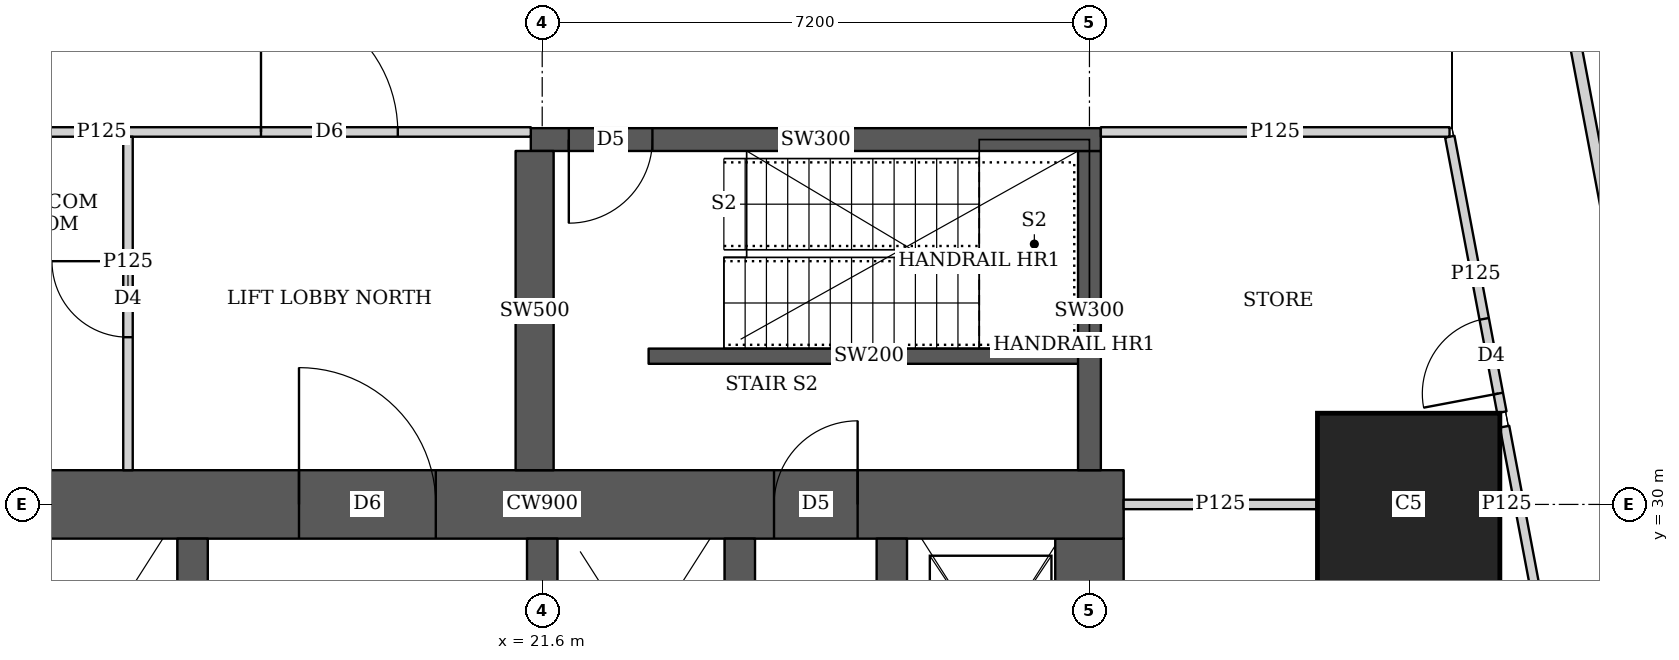
"""IFC4 building model, lengths in metres.
Left out: names, types, materials, properties, quantities, classifications, styles, units other than length and angle.
Written with IfcOpenShell. Run it as: python <this file> out.ifc"""

import sys

from ifc_helpers import new_model, si_unit, direction, frame, frame_2d, origin, origin_2d, place, context, subcontext, project, spatial, rectangle, extrude, element, fill, save


model = new_model("IFC4")
c1 = context("Model", 3, precision=1e-05, world=origin(), true_north=direction((0.0, 1.0)))
c2 = subcontext(c1, "Body", "Model", "MODEL_VIEW")
j1 = project(units=[si_unit("LENGTHUNIT", "METRE"), si_unit("PLANEANGLEUNIT", "RADIAN")], contexts=[c1])
p1 = place(None, origin())
s1 = spatial("IfcSite", under=j1, at=p1, CompositionType="ELEMENT")
p2 = place(p1, origin())
s2 = spatial("IfcBuilding", under=s1, at=p2, CompositionType="ELEMENT")
p3 = place(p2, frame((0.0, 0.0, 10.1)))
s3 = spatial("IfcBuildingStorey", under=s2, at=p3, CompositionType="ELEMENT", Elevation=10.1)
p4 = place(p3, frame((33.0, 30.0, 0.0), z_axis=(0.0, 0.0, 1.0), x_axis=(1.0, 0.0, 0.0)))
e1 = element("IfcColumn", 1, at=p4, inside=s3, PredefinedType="COLUMN", context=c2, shape_type="SweptSolid", body=[
    extrude(rectangle(XDim=2.4, YDim=2.4, at=origin_2d()), origin(), (0.0, 0.0, 1.0), 4.5),
])
p5 = place(p3, frame((13.95, 30.0, 0.0), z_axis=(0.0, 0.0, 1.0), x_axis=(1.0, 0.0, 0.0)))
e2 = element("IfcWall", 2, at=p5, inside=s3, PredefinedType="SHEAR", context=c2, shape_type="SweptSolid", body=[
    extrude(rectangle(XDim=15.3, YDim=0.9, at=frame_2d((7.65, 0.0))), origin(), (0.0, 0.0, 1.0), 4.5),
])
p6 = place(p5, frame((4.45, 0.0, 0.0)))
e3 = element("IfcOpeningElement", 3, at=p6, cuts=e2, PredefinedType="OPENING", context=c2, shape_type="SweptSolid", body=[
    extrude(rectangle(XDim=1.8, YDim=2.1, at=frame_2d((0.9, 1.05))), frame((0.0, 0.46, 0.0), z_axis=(0.0, -1.0, 0.0), x_axis=(1.0, 0.0, 0.0)), (0.0, 0.0, 1.0), 0.92),
])
p7 = place(p5, frame((10.7, 0.0, 0.0)))
e4 = element("IfcOpeningElement", 4, at=p7, cuts=e2, PredefinedType="OPENING", context=c2, shape_type="SweptSolid", body=[
    extrude(rectangle(XDim=1.1, YDim=2.1, at=frame_2d((0.55, 1.05))), frame((0.0, 0.46, 0.0), z_axis=(0.0, -1.0, 0.0), x_axis=(1.0, 0.0, 0.0)), (0.0, 0.0, 1.0), 0.92),
])
p8 = place(p3, frame((28.8, 15.45, 0.0), z_axis=(0.0, 0.0, 1.0), x_axis=(0.0, 1.0, 0.0)))
e5 = element("IfcWall", 5, at=p8, inside=s3, PredefinedType="SHEAR", context=c2, shape_type="SweptSolid", body=[
    extrude(rectangle(XDim=14.1, YDim=0.9, at=frame_2d((7.05, 0.0))), origin(), (0.0, 0.0, 1.0), 4.5),
])
for number, where, z_axis, x_axis in (
    (6, (17.0, 15.45, 0.0), (0.0, 0.0, 1.0), (0.0, 1.0, 0.0)),
    (7, (21.6, 15.45, 0.0), (0.0, 0.0, 1.0), (0.0, 1.0, 0.0)),
    (8, (24.2, 15.45, 0.0), (0.0, 0.0, 1.0), (0.0, 1.0, 0.0)),
):
    element("IfcWall", number, at=place(p3, frame(where, z_axis=z_axis, x_axis=x_axis)), inside=s3, PredefinedType="SHEAR", context=c2, shape_type="SweptSolid", body=[
        extrude(rectangle(XDim=14.1, YDim=0.4, at=frame_2d((7.05, 0.0))), origin(), (0.0, 0.0, 1.0), 4.5),
    ])
p9 = place(p3, frame((26.2, 26.45, 0.0), z_axis=(0.0, 0.0, 1.0), x_axis=(0.0, 1.0, 0.0)))
e9 = element("IfcWall", 9, at=p9, inside=s3, PredefinedType="SHEAR", context=c2, shape_type="SweptSolid", body=[
    extrude(rectangle(XDim=3.1, YDim=0.4, at=frame_2d((1.55, 0.0))), origin(), (0.0, 0.0, 1.0), 4.5),
])
p10 = place(p9, frame((1.075, 0.0, 0.0)))
e10 = element("IfcOpeningElement", 10, at=p10, cuts=e9, PredefinedType="OPENING", context=c2, shape_type="SweptSolid", body=[
    extrude(rectangle(XDim=1.2, YDim=2.1, at=frame_2d((0.6, 1.05))), frame((0.0, 0.21, 0.0), z_axis=(0.0, -1.0, 0.0), x_axis=(1.0, 0.0, 0.0)), (0.0, 0.0, 1.0), 0.42),
])
p11 = place(p3, frame((21.45, 34.8, 0.0), z_axis=(0.0, 0.0, 1.0), x_axis=(1.0, 0.0, 0.0)))
e11 = element("IfcWall", 11, at=p11, inside=s3, PredefinedType="SHEAR", context=c2, shape_type="SweptSolid", body=[
    extrude(rectangle(XDim=7.5, YDim=0.3, at=frame_2d((3.75, 0.0))), origin(), (0.0, 0.0, 1.0), 4.5),
])
p12 = place(p11, frame((0.5, 0.0, 0.0)))
e12 = element("IfcOpeningElement", 12, at=p12, cuts=e11, PredefinedType="OPENING", context=c2, shape_type="SweptSolid", body=[
    extrude(rectangle(XDim=1.1, YDim=2.1, at=frame_2d((0.55, 1.05))), frame((0.0, 0.16, 0.0), z_axis=(0.0, -1.0, 0.0), x_axis=(1.0, 0.0, 0.0)), (0.0, 0.0, 1.0), 0.32),
])
p13 = place(p3, frame((21.5, 30.45, 0.0), z_axis=(0.0, 0.0, 1.0), x_axis=(0.0, 1.0, 0.0)))
e13 = element("IfcWall", 13, at=p13, inside=s3, PredefinedType="SHEAR", context=c2, shape_type="SweptSolid", body=[
    extrude(rectangle(XDim=4.2, YDim=0.5, at=frame_2d((2.1, 0.0))), origin(), (0.0, 0.0, 1.0), 4.5),
])
p14 = place(p3, frame((28.8, 30.45, 0.0), z_axis=(0.0, 0.0, 1.0), x_axis=(0.0, 1.0, 0.0)))
e14 = element("IfcWall", 14, at=p14, inside=s3, PredefinedType="SHEAR", context=c2, shape_type="SweptSolid", body=[
    extrude(rectangle(XDim=4.2, YDim=0.3, at=frame_2d((2.1, 0.0))), origin(), (0.0, 0.0, 1.0), 4.5),
])
p15 = place(p3, frame((35.151, 36.285, 0.0), z_axis=(0.0, 0.0, 1.0), x_axis=(0.18558085056, -0.982628998099, 0.0)))
e15 = element("IfcWall", 15, at=p15, inside=s3, PredefinedType="SOLIDWALL", context=c2, shape_type="SweptSolid", body=[
    extrude(rectangle(XDim=34.352, YDim=0.15, at=frame_2d((17.176, 0.0))), origin(), (0.0, 0.0, 1.0), 2.4),
])
p16 = place(p15, frame((13.189, 0.0, 0.0)))
e16 = element("IfcOpeningElement", 16, at=p16, cuts=e15, PredefinedType="OPENING", context=c2, shape_type="SweptSolid", body=[
    extrude(rectangle(XDim=1.3, YDim=2.1, at=frame_2d((0.65, 1.05))), frame((0.0, 0.085, 0.0), z_axis=(0.0, -1.0, 0.0), x_axis=(1.0, 0.0, 0.0)), (0.0, 0.0, 1.0), 0.17),
])
p17 = place(p15, frame((19.443, 0.0, 0.0)))
e17 = element("IfcOpeningElement", 17, at=p17, cuts=e15, PredefinedType="OPENING", context=c2, shape_type="SweptSolid", body=[
    extrude(rectangle(XDim=1.3, YDim=2.1, at=frame_2d((0.65, 1.05))), frame((0.0, 0.085, 0.0), z_axis=(0.0, -1.0, 0.0), x_axis=(1.0, 0.0, 0.0)), (0.0, 0.0, 1.0), 0.17),
])
p18 = place(p15, frame((25.444, 0.0, 0.0)))
e18 = element("IfcOpeningElement", 18, at=p18, cuts=e15, PredefinedType="OPENING", context=c2, shape_type="SweptSolid", body=[
    extrude(rectangle(XDim=1.3, YDim=2.1, at=frame_2d((0.65, 1.05))), frame((0.0, 0.085, 0.0), z_axis=(0.0, -1.0, 0.0), x_axis=(1.0, 0.0, 0.0)), (0.0, 0.0, 1.0), 0.17),
])
p19 = place(p3, frame((10.163, 34.9, 0.0), z_axis=(0.0, 0.0, 1.0), x_axis=(1.0, 0.0, 0.0)))
e19 = element("IfcWall", 19, at=p19, inside=s3, PredefinedType="PARTITIONING", context=c2, shape_type="SweptSolid", body=[
    extrude(rectangle(XDim=11.287, YDim=0.125, at=frame_2d((5.644, 0.0))), origin(), (0.0, 0.0, 1.0), 2.2),
])
p20 = place(p19, frame((7.737, 0.0, 0.0)))
e20 = element("IfcOpeningElement", 20, at=p20, cuts=e19, PredefinedType="OPENING", context=c2, shape_type="SweptSolid", body=[
    extrude(rectangle(XDim=1.8, YDim=2.1, at=frame_2d((0.9, 1.05))), frame((0.0, 0.073, 0.0), z_axis=(0.0, -1.0, 0.0), x_axis=(1.0, 0.0, 0.0)), (0.0, 0.0, 1.0), 0.145),
])
p21 = place(p3, frame((16.15, 30.45, 0.0), z_axis=(0.0, 0.0, 1.0), x_axis=(0.0, 1.0, 0.0)))
e21 = element("IfcWall", 21, at=p21, inside=s3, PredefinedType="PARTITIONING", context=c2, shape_type="SweptSolid", body=[
    extrude(rectangle(XDim=4.387, YDim=0.125, at=frame_2d((2.193, 0.0))), origin(), (0.0, 0.0, 1.0), 4.2),
])
p22 = place(p21, frame((1.75, 0.0, 0.0)))
e22 = element("IfcOpeningElement", 22, at=p22, cuts=e21, PredefinedType="OPENING", context=c2, shape_type="SweptSolid", body=[
    extrude(rectangle(XDim=1.0, YDim=2.1, at=frame_2d((0.5, 1.05))), frame((0.0, 0.073, 0.0), z_axis=(0.0, -1.0, 0.0), x_axis=(1.0, 0.0, 0.0)), (0.0, 0.0, 1.0), 0.145),
])
p23 = place(p3, frame((28.95, 34.9, 0.0), z_axis=(0.0, 0.0, 1.0), x_axis=(1.0, 0.0, 0.0)))
e23 = element("IfcWall", 23, at=p23, inside=s3, PredefinedType="PARTITIONING", context=c2, shape_type="SweptSolid", body=[
    extrude(rectangle(XDim=4.588, YDim=0.125, at=frame_2d((2.294, 0.0))), origin(), (0.0, 0.0, 1.0), 2.2),
])
p24 = place(p3, frame((37.059, 16.213, 0.0), z_axis=(0.0, 0.0, 1.0), x_axis=(-0.185585225745, 0.982628171785, 0.0)))
e24 = element("IfcWall", 24, at=p24, inside=s3, PredefinedType="PARTITIONING", context=c2, shape_type="SweptSolid", body=[
    extrude(rectangle(XDim=15.072, YDim=0.125, at=frame_2d((7.536, 0.0))), origin(), (0.0, 0.0, 1.0), 2.6),
])
p25 = place(p24, frame((7.221, 0.0, 0.0)))
e25 = element("IfcOpeningElement", 25, at=p25, cuts=e24, PredefinedType="OPENING", context=c2, shape_type="SweptSolid", body=[
    extrude(rectangle(XDim=1.0, YDim=2.1, at=frame_2d((0.5, 1.05))), frame((0.0, 0.073, 0.0), z_axis=(0.0, -1.0, 0.0), x_axis=(1.0, 0.0, 0.0)), (0.0, 0.0, 1.0), 0.145),
])
p26 = place(p24, frame((0.25, 0.0, 0.0)))
e26 = element("IfcOpeningElement", 26, at=p26, cuts=e24, PredefinedType="OPENING", context=c2, shape_type="SweptSolid", body=[
    extrude(rectangle(XDim=1.0, YDim=2.1, at=frame_2d((0.5, 1.05))), frame((0.0, 0.073, 0.0), z_axis=(0.0, -1.0, 0.0), x_axis=(1.0, 0.0, 0.0)), (0.0, 0.0, 1.0), 0.145),
])
p27 = place(p24, frame((3.99, 0.0, 0.0)))
e27 = element("IfcOpeningElement", 27, at=p27, cuts=e24, PredefinedType="OPENING", context=c2, shape_type="SweptSolid", body=[
    extrude(rectangle(XDim=1.0, YDim=2.1, at=frame_2d((0.5, 1.05))), frame((0.0, 0.073, 0.0), z_axis=(0.0, -1.0, 0.0), x_axis=(1.0, 0.0, 0.0)), (0.0, 0.0, 1.0), 0.145),
])
p28 = place(p3, frame((34.226, 31.213, 0.0), z_axis=(0.0, 0.0, 1.0), x_axis=(-0.185694811189, 0.982607468472, 0.0)))
e28 = element("IfcWall", 28, at=p28, inside=s3, PredefinedType="PARTITIONING", context=c2, shape_type="SweptSolid", body=[
    extrude(rectangle(XDim=3.689, YDim=0.125, at=frame_2d((1.845, 0.0))), origin(), (0.0, 0.0, 1.0), 4.2),
])
p29 = place(p28, frame((0.25, 0.0, 0.0)))
e29 = element("IfcOpeningElement", 29, at=p29, cuts=e28, PredefinedType="OPENING", context=c2, shape_type="SweptSolid", body=[
    extrude(rectangle(XDim=1.0, YDim=2.1, at=frame_2d((0.5, 1.05))), frame((0.0, 0.073, 0.0), z_axis=(0.0, -1.0, 0.0), x_axis=(1.0, 0.0, 0.0)), (0.0, 0.0, 1.0), 0.145),
])
p30 = place(p3, frame((29.25, 30.0, 0.0), z_axis=(0.0, 0.0, 1.0), x_axis=(1.0, 0.0, 0.0)))
e30 = element("IfcWall", 30, at=p30, inside=s3, PredefinedType="PARTITIONING", context=c2, shape_type="SweptSolid", body=[
    extrude(rectangle(XDim=2.549, YDim=0.125, at=frame_2d((1.274, 0.0))), origin(), (0.0, 0.0, 1.0), 4.2),
])
p31 = place(p3, frame((34.201, 30.0, 0.0), z_axis=(0.0, 0.0, 1.0), x_axis=(1.0, 0.0, 0.0)))
e31 = element("IfcWall", 31, at=p31, inside=s3, PredefinedType="PARTITIONING", context=c2, shape_type="SweptSolid", body=[
    extrude(rectangle(XDim=0.178, YDim=0.125, at=frame_2d((0.089, 0.0))), origin(), (0.0, 0.0, 1.0), 2.6),
])
p32 = place(p3, frame((23.0, 31.95, 0.0), z_axis=(0.0, 0.0, 1.0), x_axis=(1.0, 0.0, 0.0)))
e32 = element("IfcWall", 32, at=p32, inside=s3, PredefinedType="SHEAR", context=c2, shape_type="SweptSolid", body=[
    extrude(rectangle(XDim=5.8, YDim=0.2, at=frame_2d((2.9, 0.0))), origin(), (0.0, 0.0, 1.0), 4.5),
])
p33 = place(p22, origin())
e33 = element("IfcDoor", 33, at=p33, inside=s3, OperationType="SINGLE_SWING_RIGHT", PredefinedType="DOOR", context=c2, shape_type="SweptSolid", body=[
    extrude(rectangle(XDim=1.0, YDim=2.1, at=frame_2d((0.5, 1.05))), frame((0.0, 0.025, 0.0), z_axis=(0.0, -1.0, 0.0), x_axis=(1.0, 0.0, 0.0)), (0.0, 0.0, 1.0), 0.05),
])
fill(e22, e33)
p34 = place(p20, origin())
e34 = element("IfcDoor", 34, at=p34, inside=s3, OperationType="DOUBLE_DOOR_SINGLE_SWING", PredefinedType="DOOR", context=c2, shape_type="SweptSolid", body=[
    extrude(rectangle(XDim=1.8, YDim=2.1, at=frame_2d((0.9, 1.05))), frame((0.0, 0.025, 0.0), z_axis=(0.0, -1.0, 0.0), x_axis=(1.0, 0.0, 0.0)), (0.0, 0.0, 1.0), 0.05),
])
fill(e20, e34)
p35 = place(p29, origin())
e35 = element("IfcDoor", 35, at=p35, inside=s3, OperationType="SINGLE_SWING_LEFT", PredefinedType="DOOR", context=c2, shape_type="SweptSolid", body=[
    extrude(rectangle(XDim=1.0, YDim=2.1, at=frame_2d((0.5, 1.05))), frame((0.0, 0.025, 0.0), z_axis=(0.0, -1.0, 0.0), x_axis=(1.0, 0.0, 0.0)), (0.0, 0.0, 1.0), 0.05),
])
fill(e29, e35)
p36 = place(p6, origin())
e36 = element("IfcDoor", 36, at=p36, inside=s3, OperationType="DOUBLE_DOOR_SINGLE_SWING", PredefinedType="DOOR", context=c2, shape_type="SweptSolid", body=[
    extrude(rectangle(XDim=1.8, YDim=2.1, at=frame_2d((0.9, 1.05))), frame((0.0, 0.025, 0.0), z_axis=(0.0, -1.0, 0.0), x_axis=(1.0, 0.0, 0.0)), (0.0, 0.0, 1.0), 0.05),
])
fill(e3, e36)
p37 = place(p7, origin())
e37 = element("IfcDoor", 37, at=p37, inside=s3, OperationType="SINGLE_SWING_RIGHT", PredefinedType="DOOR", context=c2, shape_type="SweptSolid", body=[
    extrude(rectangle(XDim=1.1, YDim=2.1, at=frame_2d((0.55, 1.05))), frame((0.0, 0.025, 0.0), z_axis=(0.0, -1.0, 0.0), x_axis=(1.0, 0.0, 0.0)), (0.0, 0.0, 1.0), 0.05),
])
fill(e4, e37)
p38 = place(p12, origin())
e38 = element("IfcDoor", 38, at=p38, inside=s3, OperationType="SINGLE_SWING_RIGHT", PredefinedType="DOOR", context=c2, shape_type="SweptSolid", body=[
    extrude(rectangle(XDim=1.1, YDim=2.1, at=frame_2d((0.55, 1.05))), frame((0.0, 0.025, 0.0), z_axis=(0.0, -1.0, 0.0), x_axis=(1.0, 0.0, 0.0)), (0.0, 0.0, 1.0), 0.05),
])
fill(e12, e38)
save(model, sys.argv[1])
